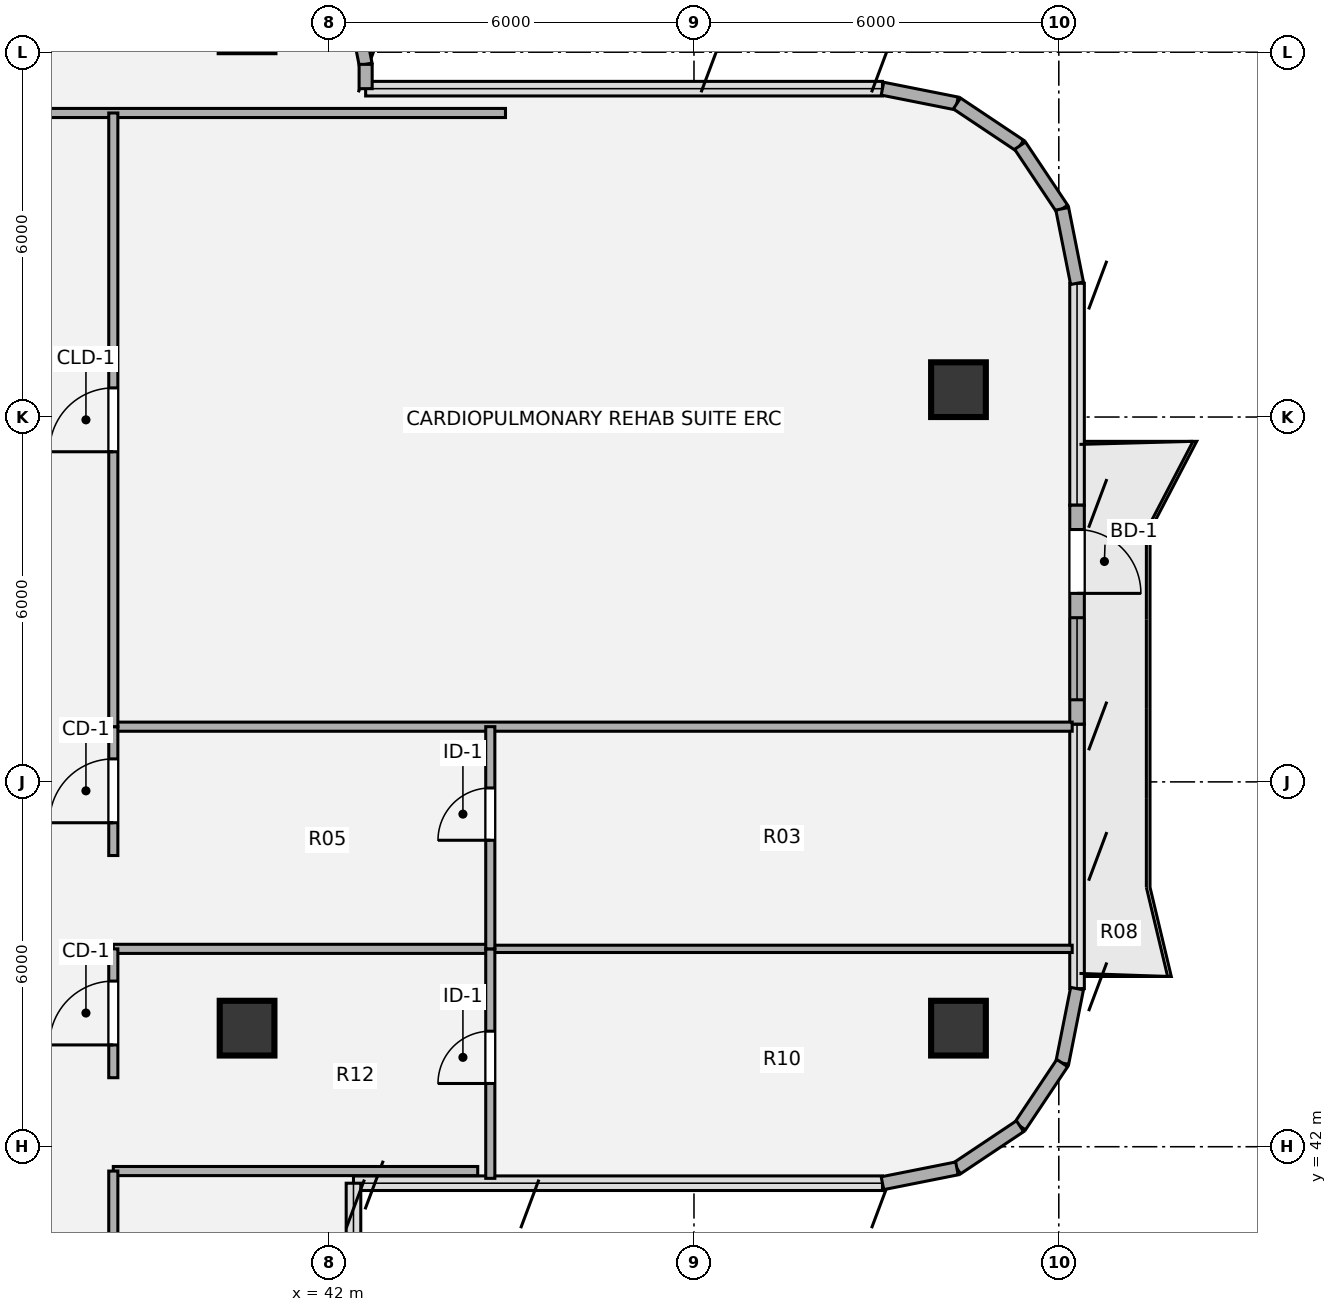
"""IFC4 building model, lengths in metres.
Left out: names, types, materials, properties, quantities, classifications, styles, units other than length and angle.
Written with IfcOpenShell. Run it as: python <this file> out.ifc"""

import sys

from ifc_helpers import new_model, si_unit, direction, frame, frame_2d, origin, origin_2d, place, context, subcontext, project, spatial, rectangle, hollow_circle, extrude, source, transform, mapped, element, fill, save


model = new_model("IFC4")
c1 = context("Model", 3, precision=1e-05, world=origin(), true_north=direction((0.0, 1.0)))
c2 = subcontext(c1, "Body", "Model", "MODEL_VIEW")
j1 = project(units=[si_unit("LENGTHUNIT", "METRE"), si_unit("PLANEANGLEUNIT", "RADIAN")], contexts=[c1])
p1 = place(None, origin())
s1 = spatial("IfcSite", under=j1, at=p1, CompositionType="ELEMENT")
p2 = place(p1, origin())
s2 = spatial("IfcBuilding", under=s1, at=p2, CompositionType="ELEMENT")
p3 = place(p2, frame((0.0, 0.0, 241.92)))
s3 = spatial("IfcBuildingStorey", under=s2, at=p3, CompositionType="ELEMENT", Elevation=241.92)
m1 = source(origin(), c2, "Body", "SweptSolid", [
    extrude(hollow_circle(Radius=0.45, WallThickness=0.032, at=origin_2d()), origin(), (0.0, 0.0, 1.0), 3.78),
])
for number, where, z_axis, x_axis in (
    (1, (52.35, 43.95, 0.0), (0.0, 0.0, 1.0), (1.0, 0.0, 0.0)),
    (2, (52.35, 54.45, 0.0), (0.0, 0.0, 1.0), (1.0, 0.0, 0.0)),
    (3, (40.65, 43.95, 0.0), (0.0, 0.0, 1.0), (1.0, 0.0, 0.0)),
):
    element("IfcColumn", number, at=place(p3, frame(where, z_axis=z_axis, x_axis=x_axis)), inside=s3, PredefinedType="COLUMN", context=c2, shape_type="MappedRepresentation", body=[
        mapped(m1, transform((0.0, 0.0, 0.0), x_axis=(1.0, 0.0, 0.0), y_axis=(0.0, 1.0, 0.0), z_axis=(0.0, 0.0, 1.0), scale=1.0)),
    ])
p4 = place(p3, frame((42.402, 60.795, 0.0), z_axis=(0.0, 0.0, 1.0), x_axis=(0.195190360752, -0.980765376158, 0.0)))
e4 = element("IfcWall", 4, at=p4, inside=s3, PredefinedType="SOLIDWALL", context=c2, shape_type="SweptSolid", body=[
    extrude(rectangle(XDim=1.014, YDim=0.215, at=frame_2d((0.507, 0.0))), origin(), (0.0, 0.0, 1.0), 3.53),
])
p5 = place(p3, frame((42.6, 59.8, 0.0), z_axis=(0.0, 0.0, 1.0), x_axis=(0.0, -1.0, 0.0)))
e5 = element("IfcWall", 5, at=p5, inside=s3, PredefinedType="SOLIDWALL", context=c2, shape_type="SweptSolid", body=[
    extrude(rectangle(XDim=0.4, YDim=0.215, at=frame_2d((0.2, 0.0))), origin(), (0.0, 0.0, 1.0), 3.53),
])
for number, where, z_axis, x_axis in (
    (6, (51.1, 59.4, 0.0), (0.0, 0.0, 1.0), (0.981, -0.195, 0.0)),
    (7, (52.325, 59.156, 0.0), (0.0, 0.0, 1.0), (0.831, -0.556, 0.0)),
    (8, (53.363, 58.463, 0.0), (0.0, 0.0, 1.0), (0.556, -0.831, 0.0)),
    (9, (54.056, 57.425, 0.0), (0.0, 0.0, 1.0), (0.195, -0.981, 0.0)),
):
    element("IfcWall", number, at=place(p3, frame(where, z_axis=z_axis, x_axis=x_axis)), inside=s3, PredefinedType="SOLIDWALL", context=c2, shape_type="SweptSolid", body=[
        extrude(rectangle(XDim=1.249, YDim=0.215, at=frame_2d((0.624, 0.0))), origin(), (0.0, 0.0, 1.0), 3.53),
    ])
p6 = place(p3, frame((54.3, 52.55, 0.0), z_axis=(0.0, 0.0, 1.0), x_axis=(0.0, -1.0, 0.0)))
e10 = element("IfcWall", 10, at=p6, inside=s3, PredefinedType="SOLIDWALL", context=c2, shape_type="SweptSolid", body=[
    extrude(rectangle(XDim=3.6, YDim=0.24, at=frame_2d((1.8, 0.0))), origin(), (0.0, 0.0, 1.0), 3.53),
])
p7 = place(p6, frame((0.4, 0.0, 0.0)))
e11 = element("IfcOpeningElement", 11, at=p7, cuts=e10, PredefinedType="OPENING", context=c2, shape_type="SweptSolid", body=[
    extrude(rectangle(XDim=1.05, YDim=2.15, at=origin_2d()), frame((0.525, 0.13, 1.075), z_axis=(0.0, -1.0, 0.0), x_axis=(1.0, 0.0, 0.0)), (0.0, 0.0, 1.0), 0.26),
])
p8 = place(p6, frame((1.85, 0.0, 0.85)))
e12 = element("IfcOpeningElement", 12, at=p8, cuts=e10, PredefinedType="OPENING", context=c2, shape_type="SweptSolid", body=[
    extrude(rectangle(XDim=1.35, YDim=1.35, at=origin_2d()), frame((0.675, 0.13, 0.675), z_axis=(0.0, -1.0, 0.0), x_axis=(1.0, 0.0, 0.0)), (0.0, 0.0, 1.0), 0.26),
])
for number, where, z_axis, x_axis in (
    (13, (54.3, 44.6, 0.0), (0.0, 0.0, 1.0), (-0.195, -0.981, 0.0)),
    (14, (54.056, 43.375, 0.0), (0.0, 0.0, 1.0), (-0.556, -0.831, 0.0)),
    (15, (53.363, 42.337, 0.0), (0.0, 0.0, 1.0), (-0.831, -0.556, 0.0)),
    (16, (52.325, 41.644, 0.0), (0.0, 0.0, 1.0), (-0.981, -0.195, 0.0)),
):
    element("IfcWall", number, at=place(p3, frame(where, z_axis=z_axis, x_axis=x_axis)), inside=s3, PredefinedType="SOLIDWALL", context=c2, shape_type="SweptSolid", body=[
        extrude(rectangle(XDim=1.249, YDim=0.215, at=frame_2d((0.624, 0.0))), origin(), (0.0, 0.0, 1.0), 3.53),
    ])
p9 = place(p3, frame((38.45, 41.6, 0.0), z_axis=(0.0, 0.0, 1.0), x_axis=(1.0, 0.0, 0.0)))
e17 = element("IfcWall", 17, at=p9, inside=s3, PredefinedType="PARTITIONING", context=c2, shape_type="SweptSolid", body=[
    extrude(rectangle(XDim=5.993, YDim=0.15, at=frame_2d((2.997, 0.0))), origin(), (0.0, 0.0, 1.0), 3.5),
])
p10 = place(p3, frame((38.45, 45.254, 0.0), z_axis=(0.0, 0.0, 1.0), x_axis=(1.0, 0.0, 0.0)))
e18 = element("IfcWall", 18, at=p10, inside=s3, PredefinedType="PARTITIONING", context=c2, shape_type="SweptSolid", body=[
    extrude(rectangle(XDim=6.2, YDim=0.15, at=frame_2d((3.1, 0.0))), origin(), (0.0, 0.0, 1.0), 2.982),
])
p11 = place(p3, frame((44.65, 45.254, 0.0), z_axis=(0.0, 0.0, 1.0), x_axis=(1.0, 0.0, 0.0)))
e19 = element("IfcWall", 19, at=p11, inside=s3, PredefinedType="PARTITIONING", context=c2, shape_type="SweptSolid", body=[
    extrude(rectangle(XDim=9.57, YDim=0.12, at=frame_2d((4.785, 0.0))), origin(), (0.0, 0.0, 1.0), 2.982),
])
p12 = place(p3, frame((38.45, 48.908, 0.0), z_axis=(0.0, 0.0, 1.0), x_axis=(1.0, 0.0, 0.0)))
e20 = element("IfcWall", 20, at=p12, inside=s3, PredefinedType="PARTITIONING", context=c2, shape_type="SweptSolid", body=[
    extrude(rectangle(XDim=15.77, YDim=0.15, at=frame_2d((7.885, 0.0))), origin(), (0.0, 0.0, 1.0), 2.982),
])
p13 = place(p3, frame((27.1, 59.0, 0.0), z_axis=(0.0, 0.0, 1.0), x_axis=(1.0, 0.0, 0.0)))
e21 = element("IfcWall", 21, at=p13, inside=s3, PredefinedType="PARTITIONING", context=c2, shape_type="SweptSolid", body=[
    extrude(rectangle(XDim=17.8, YDim=0.15, at=frame_2d((8.9, 0.0))), origin(), (0.0, 0.0, 1.0), 3.308),
])
p14 = place(p13, frame((8.375, 0.0, 0.0)))
e22 = element("IfcOpeningElement", 22, at=p14, cuts=e21, PredefinedType="OPENING", context=c2, shape_type="SweptSolid", body=[
    extrude(rectangle(XDim=1.05, YDim=2.1, at=origin_2d()), frame((0.525, 0.085, 1.05), z_axis=(0.0, -1.0, 0.0), x_axis=(1.0, 0.0, 0.0)), (0.0, 0.0, 1.0), 0.17),
])
p15 = place(p3, frame((38.45, 22.4, 0.0), z_axis=(0.0, 0.0, 1.0), x_axis=(0.0, 1.0, 0.0)))
e23 = element("IfcWall", 23, at=p15, inside=s3, PredefinedType="PARTITIONING", context=c2, shape_type="SweptSolid", body=[
    extrude(rectangle(XDim=19.2, YDim=0.15, at=frame_2d((9.6, 0.0))), origin(), (0.0, 0.0, 1.0), 3.5),
])
p16 = place(p15, frame((8.975, 0.0, 0.0)))
e24 = element("IfcOpeningElement", 24, at=p16, cuts=e23, PredefinedType="OPENING", context=c2, shape_type="SweptSolid", body=[
    extrude(rectangle(XDim=1.05, YDim=2.1, at=origin_2d()), frame((0.525, 0.085, 1.05), z_axis=(0.0, -1.0, 0.0), x_axis=(1.0, 0.0, 0.0)), (0.0, 0.0, 1.0), 0.17),
])
p17 = place(p3, frame((38.45, 43.135, 0.0), z_axis=(0.0, 0.0, 1.0), x_axis=(0.0, 1.0, 0.0)))
e25 = element("IfcWall", 25, at=p17, inside=s3, PredefinedType="PARTITIONING", context=c2, shape_type="SweptSolid", body=[
    extrude(rectangle(XDim=2.119, YDim=0.15, at=frame_2d((1.06, 0.0))), origin(), (0.0, 0.0, 1.0), 3.5),
])
p18 = place(p17, frame((0.539, 0.0, 0.0)))
e26 = element("IfcOpeningElement", 26, at=p18, cuts=e25, PredefinedType="OPENING", context=c2, shape_type="SweptSolid", body=[
    extrude(rectangle(XDim=1.05, YDim=2.1, at=origin_2d()), frame((0.525, 0.085, 1.05), z_axis=(0.0, -1.0, 0.0), x_axis=(1.0, 0.0, 0.0)), (0.0, 0.0, 1.0), 0.17),
])
p19 = place(p3, frame((38.45, 46.789, 0.0), z_axis=(0.0, 0.0, 1.0), x_axis=(0.0, 1.0, 0.0)))
e27 = element("IfcWall", 27, at=p19, inside=s3, PredefinedType="PARTITIONING", context=c2, shape_type="SweptSolid", body=[
    extrude(rectangle(XDim=2.119, YDim=0.15, at=frame_2d((1.06, 0.0))), origin(), (0.0, 0.0, 1.0), 3.5),
])
p20 = place(p19, frame((0.539, 0.0, 0.0)))
e28 = element("IfcOpeningElement", 28, at=p20, cuts=e27, PredefinedType="OPENING", context=c2, shape_type="SweptSolid", body=[
    extrude(rectangle(XDim=1.05, YDim=2.1, at=origin_2d()), frame((0.525, 0.085, 1.05), z_axis=(0.0, -1.0, 0.0), x_axis=(1.0, 0.0, 0.0)), (0.0, 0.0, 1.0), 0.17),
])
p21 = place(p3, frame((38.45, 48.908, 0.0), z_axis=(0.0, 0.0, 1.0), x_axis=(0.0, 1.0, 0.0)))
e29 = element("IfcWall", 29, at=p21, inside=s3, PredefinedType="PARTITIONING", context=c2, shape_type="SweptSolid", body=[
    extrude(rectangle(XDim=10.092, YDim=0.15, at=frame_2d((5.046, 0.0))), origin(), (0.0, 0.0, 1.0), 3.5),
])
p22 = place(p21, frame((4.521, 0.0, 0.0)))
e30 = element("IfcOpeningElement", 30, at=p22, cuts=e29, PredefinedType="OPENING", context=c2, shape_type="SweptSolid", body=[
    extrude(rectangle(XDim=1.05, YDim=2.1, at=origin_2d()), frame((0.525, 0.085, 1.05), z_axis=(0.0, -1.0, 0.0), x_axis=(1.0, 0.0, 0.0)), (0.0, 0.0, 1.0), 0.17),
])
p23 = place(p3, frame((44.65, 41.48, 0.0), z_axis=(0.0, 0.0, 1.0), x_axis=(0.0, 1.0, 0.0)))
e31 = element("IfcWall", 31, at=p23, inside=s3, PredefinedType="PARTITIONING", context=c2, shape_type="SweptSolid", body=[
    extrude(rectangle(XDim=3.774, YDim=0.15, at=frame_2d((1.887, 0.0))), origin(), (0.0, 0.0, 1.0), 3.5),
])
p24 = place(p23, frame((1.56, 0.0, 0.0)))
e32 = element("IfcOpeningElement", 32, at=p24, cuts=e31, PredefinedType="OPENING", context=c2, shape_type="SweptSolid", body=[
    extrude(rectangle(XDim=0.86, YDim=2.1, at=origin_2d()), frame((0.43, 0.085, 1.05), z_axis=(0.0, -1.0, 0.0), x_axis=(1.0, 0.0, 0.0)), (0.0, 0.0, 1.0), 0.17),
])
p25 = place(p3, frame((44.65, 45.254, 0.0), z_axis=(0.0, 0.0, 1.0), x_axis=(0.0, 1.0, 0.0)))
e33 = element("IfcWall", 33, at=p25, inside=s3, PredefinedType="PARTITIONING", context=c2, shape_type="SweptSolid", body=[
    extrude(rectangle(XDim=3.654, YDim=0.15, at=frame_2d((1.827, 0.0))), origin(), (0.0, 0.0, 1.0), 3.5),
])
p26 = place(p25, frame((1.786, 0.0, 0.0)))
e34 = element("IfcOpeningElement", 34, at=p26, cuts=e33, PredefinedType="OPENING", context=c2, shape_type="SweptSolid", body=[
    extrude(rectangle(XDim=0.86, YDim=2.1, at=origin_2d()), frame((0.43, 0.085, 1.05), z_axis=(0.0, -1.0, 0.0), x_axis=(1.0, 0.0, 0.0)), (0.0, 0.0, 1.0), 0.17),
])
m2 = source(origin(), c2, "Body", "SweptSolid", [
    extrude(rectangle(XDim=1.05, YDim=2.15, at=origin_2d()), frame((0.525, 0.025, 1.075), z_axis=(0.0, -1.0, 0.0), x_axis=(1.0, 0.0, 0.0)), (0.0, 0.0, 1.0), 0.05),
])
p27 = place(p7, origin())
e35 = element("IfcDoor", 35, at=p27, inside=s3, OperationType="SINGLE_SWING_RIGHT", PredefinedType="DOOR", context=c2, shape_type="MappedRepresentation", body=[
    mapped(m2, transform((0.0, 0.0, 0.0), x_axis=(1.0, 0.0, 0.0), y_axis=(0.0, 1.0, 0.0), z_axis=(0.0, 0.0, 1.0), scale=1.0)),
])
fill(e11, e35)
m3 = source(origin(), c2, "Body", "SweptSolid", [
    extrude(rectangle(XDim=1.35, YDim=1.35, at=origin_2d()), frame((0.675, 0.03, 0.675), z_axis=(0.0, -1.0, 0.0), x_axis=(1.0, 0.0, 0.0)), (0.0, 0.0, 1.0), 0.06),
])
p28 = place(p8, origin())
e36 = element("IfcWindow", 36, at=p28, inside=s3, PartitioningType="SINGLE_PANEL", PredefinedType="WINDOW", context=c2, shape_type="MappedRepresentation", body=[
    mapped(m3, transform((0.0, 0.0, 0.0), x_axis=(1.0, 0.0, 0.0), y_axis=(0.0, 1.0, 0.0), z_axis=(0.0, 0.0, 1.0), scale=1.0)),
])
fill(e12, e36)
m4 = source(origin(), c2, "Body", "SweptSolid", [
    extrude(rectangle(XDim=1.05, YDim=2.1, at=origin_2d()), frame((0.525, 0.025, 1.05), z_axis=(0.0, -1.0, 0.0), x_axis=(1.0, 0.0, 0.0)), (0.0, 0.0, 1.0), 0.05),
])
p29 = place(p18, origin())
e37 = element("IfcDoor", 37, at=p29, inside=s3, OperationType="SINGLE_SWING_LEFT", PredefinedType="DOOR", context=c2, shape_type="MappedRepresentation", body=[
    mapped(m4, transform((0.0, 0.0, 0.0), x_axis=(1.0, 0.0, 0.0), y_axis=(0.0, 1.0, 0.0), z_axis=(0.0, 0.0, 1.0), scale=1.0)),
])
fill(e26, e37)
p30 = place(p20, origin())
e38 = element("IfcDoor", 38, at=p30, inside=s3, OperationType="SINGLE_SWING_LEFT", PredefinedType="DOOR", context=c2, shape_type="MappedRepresentation", body=[
    mapped(m4, transform((0.0, 0.0, 0.0), x_axis=(1.0, 0.0, 0.0), y_axis=(0.0, 1.0, 0.0), z_axis=(0.0, 0.0, 1.0), scale=1.0)),
])
fill(e28, e38)
m5 = source(origin(), c2, "Body", "SweptSolid", [
    extrude(rectangle(XDim=1.05, YDim=2.1, at=origin_2d()), frame((0.525, 0.025, 1.05), z_axis=(0.0, -1.0, 0.0), x_axis=(1.0, 0.0, 0.0)), (0.0, 0.0, 1.0), 0.05),
])
p31 = place(p22, origin())
e39 = element("IfcDoor", 39, at=p31, inside=s3, OperationType="SINGLE_SWING_LEFT", PredefinedType="DOOR", context=c2, shape_type="MappedRepresentation", body=[
    mapped(m5, transform((0.0, 0.0, 0.0), x_axis=(1.0, 0.0, 0.0), y_axis=(0.0, 1.0, 0.0), z_axis=(0.0, 0.0, 1.0), scale=1.0)),
])
fill(e30, e39)
m6 = source(origin(), c2, "Body", "SweptSolid", [
    extrude(rectangle(XDim=0.86, YDim=2.1, at=origin_2d()), frame((0.43, 0.025, 1.05), z_axis=(0.0, -1.0, 0.0), x_axis=(1.0, 0.0, 0.0)), (0.0, 0.0, 1.0), 0.05),
])
p32 = place(p24, origin())
e40 = element("IfcDoor", 40, at=p32, inside=s3, OperationType="SINGLE_SWING_LEFT", PredefinedType="DOOR", context=c2, shape_type="MappedRepresentation", body=[
    mapped(m6, transform((0.0, 0.0, 0.0), x_axis=(1.0, 0.0, 0.0), y_axis=(0.0, 1.0, 0.0), z_axis=(0.0, 0.0, 1.0), scale=1.0)),
])
fill(e32, e40)
p33 = place(p26, origin())
e41 = element("IfcDoor", 41, at=p33, inside=s3, OperationType="SINGLE_SWING_LEFT", PredefinedType="DOOR", context=c2, shape_type="MappedRepresentation", body=[
    mapped(m6, transform((0.0, 0.0, 0.0), x_axis=(1.0, 0.0, 0.0), y_axis=(0.0, 1.0, 0.0), z_axis=(0.0, 0.0, 1.0), scale=1.0)),
])
fill(e34, e41)
save(model, sys.argv[1])
